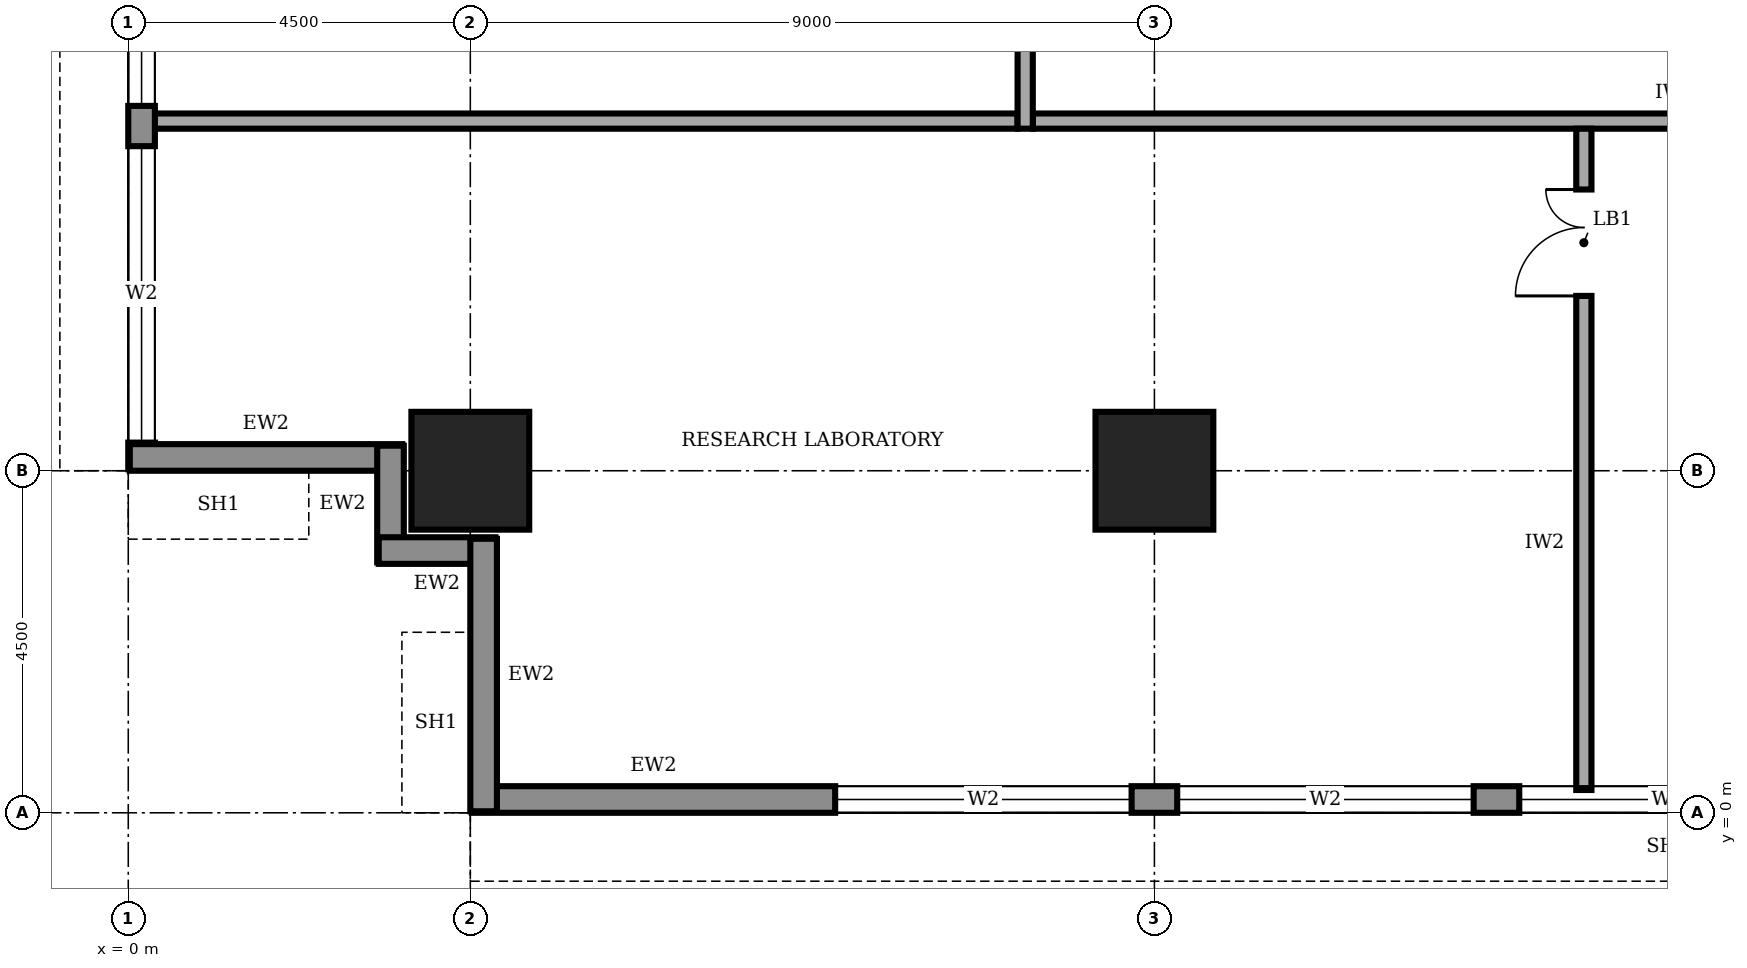
"""IFC4 building model, lengths in metres.
Left out: names, types, materials, properties, quantities, classifications, styles, units other than length and angle.
Written with IfcOpenShell. Run it as: python <this file> out.ifc"""

import sys

from ifc_helpers import new_model, si_unit, direction, frame, frame_2d, origin, origin_2d, place, context, subcontext, project, spatial, rectangle, extrude, element, fill, save


model = new_model("IFC4")
c1 = context("Model", 3, precision=1e-05, world=origin(), true_north=direction((0.0, 1.0)))
c2 = subcontext(c1, "Body", "Model", "MODEL_VIEW")
j1 = project(units=[si_unit("LENGTHUNIT", "METRE"), si_unit("PLANEANGLEUNIT", "RADIAN")], contexts=[c1])
p1 = place(None, origin())
s1 = spatial("IfcSite", under=j1, at=p1, CompositionType="ELEMENT")
p2 = place(p1, origin())
s2 = spatial("IfcBuilding", under=s1, at=p2, CompositionType="ELEMENT")
p3 = place(p2, frame((0.0, 0.0, 233.0)))
s3 = spatial("IfcBuildingStorey", under=s2, at=p3, CompositionType="ELEMENT", Elevation=233.0)
for number, where, z_axis, x_axis in (
    (1, (4.5, 4.5, 0.0), (0.0, 0.0, 1.0), (1.0, 0.0, 0.0)),
    (2, (13.5, 4.5, 0.0), (0.0, 0.0, 1.0), (1.0, 0.0, 0.0)),
):
    element("IfcColumn", number, at=place(p3, frame(where, z_axis=z_axis, x_axis=x_axis)), inside=s3, PredefinedType="COLUMN", context=c2, shape_type="SweptSolid", body=[
        extrude(rectangle(XDim=1.55, YDim=1.55, at=origin_2d()), origin(), (0.0, 0.0, 1.0), 4.0),
    ])
p4 = place(p3, frame((4.52, 0.175, 0.0), z_axis=(0.0, 0.0, 1.0), x_axis=(1.0, 0.0, 0.0)))
e3 = element("IfcWall", 3, at=p4, inside=s3, PredefinedType="STANDARD", context=c2, shape_type="SweptSolid", body=[
    extrude(rectangle(XDim=31.46, YDim=0.35, at=frame_2d((15.73, 0.0))), origin(), (0.0, 0.0, 1.0), 3.75),
])
p5 = place(p4, frame((4.78, 0.0, 0.6)))
e4 = element("IfcOpeningElement", 4, at=p5, cuts=e3, PredefinedType="OPENING", context=c2, shape_type="SweptSolid", body=[
    extrude(rectangle(XDim=3.9, YDim=2.6, at=frame_2d((1.95, 1.3))), frame((0.0, 0.185, 0.0), z_axis=(0.0, -1.0, 0.0), x_axis=(1.0, 0.0, 0.0)), (0.0, 0.0, 1.0), 0.37),
])
p6 = place(p4, frame((9.28, 0.0, 0.6)))
e5 = element("IfcOpeningElement", 5, at=p6, cuts=e3, PredefinedType="OPENING", context=c2, shape_type="SweptSolid", body=[
    extrude(rectangle(XDim=3.9, YDim=2.6, at=frame_2d((1.95, 1.3))), frame((0.0, 0.185, 0.0), z_axis=(0.0, -1.0, 0.0), x_axis=(1.0, 0.0, 0.0)), (0.0, 0.0, 1.0), 0.37),
])
p7 = place(p4, frame((13.78, 0.0, 0.6)))
e6 = element("IfcOpeningElement", 6, at=p7, cuts=e3, PredefinedType="OPENING", context=c2, shape_type="SweptSolid", body=[
    extrude(rectangle(XDim=3.9, YDim=2.6, at=frame_2d((1.95, 1.3))), frame((0.0, 0.185, 0.0), z_axis=(0.0, -1.0, 0.0), x_axis=(1.0, 0.0, 0.0)), (0.0, 0.0, 1.0), 0.37),
])
p8 = place(p4, frame((18.28, 0.0, 0.6)))
e7 = element("IfcOpeningElement", 7, at=p8, cuts=e3, PredefinedType="OPENING", context=c2, shape_type="SweptSolid", body=[
    extrude(rectangle(XDim=3.9, YDim=2.6, at=frame_2d((1.95, 1.3))), frame((0.0, 0.185, 0.0), z_axis=(0.0, -1.0, 0.0), x_axis=(1.0, 0.0, 0.0)), (0.0, 0.0, 1.0), 0.37),
])
p9 = place(p4, frame((22.78, 0.0, 0.6)))
e8 = element("IfcOpeningElement", 8, at=p9, cuts=e3, PredefinedType="OPENING", context=c2, shape_type="SweptSolid", body=[
    extrude(rectangle(XDim=3.9, YDim=2.6, at=frame_2d((1.95, 1.3))), frame((0.0, 0.185, 0.0), z_axis=(0.0, -1.0, 0.0), x_axis=(1.0, 0.0, 0.0)), (0.0, 0.0, 1.0), 0.37),
])
p10 = place(p4, frame((27.21, 0.0, 0.6)))
e9 = element("IfcOpeningElement", 9, at=p10, cuts=e3, PredefinedType="OPENING", context=c2, shape_type="SweptSolid", body=[
    extrude(rectangle(XDim=3.9, YDim=2.6, at=frame_2d((1.95, 1.3))), frame((0.0, 0.185, 0.0), z_axis=(0.0, -1.0, 0.0), x_axis=(1.0, 0.0, 0.0)), (0.0, 0.0, 1.0), 0.37),
])
p11 = place(p3, frame((0.175, 35.98, 0.0), z_axis=(0.0, 0.0, 1.0), x_axis=(0.0, -1.0, 0.0)))
e10 = element("IfcWall", 10, at=p11, inside=s3, PredefinedType="STANDARD", context=c2, shape_type="SweptSolid", body=[
    extrude(rectangle(XDim=31.46, YDim=0.35, at=frame_2d((15.73, 0.0))), origin(), (0.0, 0.0, 1.0), 3.75),
])
p12 = place(p11, frame((27.21, 0.0, 0.6)))
e11 = element("IfcOpeningElement", 11, at=p12, cuts=e10, PredefinedType="OPENING", context=c2, shape_type="SweptSolid", body=[
    extrude(rectangle(XDim=3.9, YDim=2.6, at=frame_2d((1.95, 1.3))), frame((0.0, 0.185, 0.0), z_axis=(0.0, -1.0, 0.0), x_axis=(1.0, 0.0, 0.0)), (0.0, 0.0, 1.0), 0.37),
])
p13 = place(p11, frame((22.78, 0.0, 0.6)))
e12 = element("IfcOpeningElement", 12, at=p13, cuts=e10, PredefinedType="OPENING", context=c2, shape_type="SweptSolid", body=[
    extrude(rectangle(XDim=3.9, YDim=2.6, at=frame_2d((1.95, 1.3))), frame((0.0, 0.185, 0.0), z_axis=(0.0, -1.0, 0.0), x_axis=(1.0, 0.0, 0.0)), (0.0, 0.0, 1.0), 0.37),
])
p14 = place(p11, frame((18.28, 0.0, 0.6)))
e13 = element("IfcOpeningElement", 13, at=p14, cuts=e10, PredefinedType="OPENING", context=c2, shape_type="SweptSolid", body=[
    extrude(rectangle(XDim=3.9, YDim=2.6, at=frame_2d((1.95, 1.3))), frame((0.0, 0.185, 0.0), z_axis=(0.0, -1.0, 0.0), x_axis=(1.0, 0.0, 0.0)), (0.0, 0.0, 1.0), 0.37),
])
p15 = place(p11, frame((13.78, 0.0, 0.6)))
e14 = element("IfcOpeningElement", 14, at=p15, cuts=e10, PredefinedType="OPENING", context=c2, shape_type="SweptSolid", body=[
    extrude(rectangle(XDim=3.9, YDim=2.6, at=frame_2d((1.95, 1.3))), frame((0.0, 0.185, 0.0), z_axis=(0.0, -1.0, 0.0), x_axis=(1.0, 0.0, 0.0)), (0.0, 0.0, 1.0), 0.37),
])
p16 = place(p11, frame((9.28, 0.0, 0.6)))
e15 = element("IfcOpeningElement", 15, at=p16, cuts=e10, PredefinedType="OPENING", context=c2, shape_type="SweptSolid", body=[
    extrude(rectangle(XDim=3.9, YDim=2.6, at=frame_2d((1.95, 1.3))), frame((0.0, 0.185, 0.0), z_axis=(0.0, -1.0, 0.0), x_axis=(1.0, 0.0, 0.0)), (0.0, 0.0, 1.0), 0.37),
])
p17 = place(p11, frame((4.78, 0.0, 0.6)))
e16 = element("IfcOpeningElement", 16, at=p17, cuts=e10, PredefinedType="OPENING", context=c2, shape_type="SweptSolid", body=[
    extrude(rectangle(XDim=3.9, YDim=2.6, at=frame_2d((1.95, 1.3))), frame((0.0, 0.185, 0.0), z_axis=(0.0, -1.0, 0.0), x_axis=(1.0, 0.0, 0.0)), (0.0, 0.0, 1.0), 0.37),
])
p18 = place(p3, frame((0.02, 4.675, 0.0), z_axis=(0.0, 0.0, 1.0), x_axis=(1.0, 0.0, 0.0)))
e17 = element("IfcWall", 17, at=p18, inside=s3, PredefinedType="STANDARD", context=c2, shape_type="SweptSolid", body=[
    extrude(rectangle(XDim=3.585, YDim=0.35, at=frame_2d((1.792, 0.0))), origin(), (0.0, 0.0, 1.0), 2.85),
])
for number, where, z_axis, x_axis in (
    (18, (3.45, 4.83, 0.0), (0.0, 0.0, 1.0), (0.0, -1.0, 0.0)),
    (19, (3.295, 3.45, 0.0), (0.0, 0.0, 1.0), (1.0, 0.0, 0.0)),
):
    element("IfcWall", number, at=place(p3, frame(where, z_axis=z_axis, x_axis=x_axis)), inside=s3, PredefinedType="STANDARD", context=c2, shape_type="SweptSolid", body=[
        extrude(rectangle(XDim=1.535, YDim=0.35, at=frame_2d((0.768, 0.0))), origin(), (0.0, 0.0, 1.0), 3.75),
    ])
p19 = place(p3, frame((4.675, 3.605, 0.0), z_axis=(0.0, 0.0, 1.0), x_axis=(0.0, -1.0, 0.0)))
e20 = element("IfcWall", 20, at=p19, inside=s3, PredefinedType="STANDARD", context=c2, shape_type="SweptSolid", body=[
    extrude(rectangle(XDim=3.585, YDim=0.35, at=frame_2d((1.792, 0.0))), origin(), (0.0, 0.0, 1.0), 2.85),
])
p20 = place(p3, frame((11.9, 9.1, 0.0), z_axis=(0.0, 0.0, 1.0), x_axis=(1.0, 0.0, 0.0)))
e21 = element("IfcWall", 21, at=p20, inside=s3, PredefinedType="SOLIDWALL", context=c2, shape_type="SweptSolid", body=[
    extrude(rectangle(XDim=16.9, YDim=0.2, at=frame_2d((8.45, 0.0))), origin(), (0.0, 0.0, 1.0), 3.75),
])
p21 = place(p3, frame((11.8, 32.05, 0.0), z_axis=(0.0, 0.0, 1.0), x_axis=(0.0, -1.0, 0.0)))
e22 = element("IfcWall", 22, at=p21, inside=s3, PredefinedType="SOLIDWALL", context=c2, shape_type="SweptSolid", body=[
    extrude(rectangle(XDim=23.05, YDim=0.2, at=frame_2d((11.525, 0.0))), origin(), (0.0, 0.0, 1.0), 3.75),
])
p22 = place(p21, frame((20.3, 0.0, 0.0)))
e23 = element("IfcOpeningElement", 23, at=p22, cuts=e22, PredefinedType="OPENING", context=c2, shape_type="SweptSolid", body=[
    extrude(rectangle(XDim=1.0, YDim=2.1, at=frame_2d((0.5, 1.05))), frame((0.0, 0.11, 0.0), z_axis=(0.0, -1.0, 0.0), x_axis=(1.0, 0.0, 0.0)), (0.0, 0.0, 1.0), 0.22),
])
p23 = place(p21, frame((16.2, 0.0, 0.0)))
e24 = element("IfcOpeningElement", 24, at=p23, cuts=e22, PredefinedType="OPENING", context=c2, shape_type="SweptSolid", body=[
    extrude(rectangle(XDim=0.9, YDim=2.1, at=frame_2d((0.45, 1.05))), frame((0.0, 0.11, 0.0), z_axis=(0.0, -1.0, 0.0), x_axis=(1.0, 0.0, 0.0)), (0.0, 0.0, 1.0), 0.22),
])
p24 = place(p21, frame((13.2, 0.0, 0.0)))
e25 = element("IfcOpeningElement", 25, at=p24, cuts=e22, PredefinedType="OPENING", context=c2, shape_type="SweptSolid", body=[
    extrude(rectangle(XDim=0.9, YDim=2.1, at=frame_2d((0.45, 1.05))), frame((0.0, 0.11, 0.0), z_axis=(0.0, -1.0, 0.0), x_axis=(1.0, 0.0, 0.0)), (0.0, 0.0, 1.0), 0.22),
])
p25 = place(p21, frame((8.35, 0.0, 0.0)))
e26 = element("IfcOpeningElement", 26, at=p25, cuts=e22, PredefinedType="OPENING", context=c2, shape_type="SweptSolid", body=[
    extrude(rectangle(XDim=0.9, YDim=2.1, at=frame_2d((0.45, 1.05))), frame((0.0, 0.11, 0.0), z_axis=(0.0, -1.0, 0.0), x_axis=(1.0, 0.0, 0.0)), (0.0, 0.0, 1.0), 0.22),
])
p26 = place(p21, frame((5.55, 0.0, 0.0)))
e27 = element("IfcOpeningElement", 27, at=p26, cuts=e22, PredefinedType="OPENING", context=c2, shape_type="SweptSolid", body=[
    extrude(rectangle(XDim=1.0, YDim=2.1, at=frame_2d((0.5, 1.05))), frame((0.0, 0.11, 0.0), z_axis=(0.0, -1.0, 0.0), x_axis=(1.0, 0.0, 0.0)), (0.0, 0.0, 1.0), 0.22),
])
p27 = place(p21, frame((11.05, 0.0, 0.0)))
e28 = element("IfcOpeningElement", 28, at=p27, cuts=e22, PredefinedType="OPENING", context=c2, shape_type="SweptSolid", body=[
    extrude(rectangle(XDim=1.0, YDim=2.1, at=frame_2d((0.5, 1.05))), frame((0.0, 0.11, 0.0), z_axis=(0.0, -1.0, 0.0), x_axis=(1.0, 0.0, 0.0)), (0.0, 0.0, 1.0), 0.22),
])
p28 = place(p21, frame((1.925, 0.0, 0.0)))
e29 = element("IfcOpeningElement", 29, at=p28, cuts=e22, PredefinedType="OPENING", context=c2, shape_type="SweptSolid", body=[
    extrude(rectangle(XDim=1.0, YDim=2.1, at=frame_2d((0.5, 1.05))), frame((0.0, 0.11, 0.0), z_axis=(0.0, -1.0, 0.0), x_axis=(1.0, 0.0, 0.0)), (0.0, 0.0, 1.0), 0.22),
])
p29 = place(p3, frame((19.15, 0.3, 0.0), z_axis=(0.0, 0.0, 1.0), x_axis=(0.0, 1.0, 0.0)))
e30 = element("IfcWall", 30, at=p29, inside=s3, PredefinedType="SOLIDWALL", context=c2, shape_type="SweptSolid", body=[
    extrude(rectangle(XDim=8.7, YDim=0.2, at=frame_2d((4.35, 0.0))), origin(), (0.0, 0.0, 1.0), 3.75),
])
p30 = place(p29, frame((6.5, 0.0, 0.0)))
e31 = element("IfcOpeningElement", 31, at=p30, cuts=e30, PredefinedType="OPENING", context=c2, shape_type="SweptSolid", body=[
    extrude(rectangle(XDim=1.4, YDim=2.1, at=frame_2d((0.7, 1.05))), frame((0.0, 0.11, 0.0), z_axis=(0.0, -1.0, 0.0), x_axis=(1.0, 0.0, 0.0)), (0.0, 0.0, 1.0), 0.22),
])
p31 = place(p3, frame((0.3, 9.1, 0.0), z_axis=(0.0, 0.0, 1.0), x_axis=(1.0, 0.0, 0.0)))
e32 = element("IfcWall", 32, at=p31, inside=s3, PredefinedType="SOLIDWALL", context=c2, shape_type="SweptSolid", body=[
    extrude(rectangle(XDim=11.4, YDim=0.2, at=frame_2d((5.7, 0.0))), origin(), (0.0, 0.0, 1.0), 3.75),
])
p32 = place(p5, origin())
e33 = element("IfcWindow", 33, at=p32, inside=s3, PartitioningType="SINGLE_PANEL", PredefinedType="WINDOW", context=c2, shape_type="SweptSolid", body=[
    extrude(rectangle(XDim=3.9, YDim=2.6, at=frame_2d((1.95, 1.3))), frame((0.0, 0.03, 0.0), z_axis=(0.0, -1.0, 0.0), x_axis=(1.0, 0.0, 0.0)), (0.0, 0.0, 1.0), 0.06),
])
fill(e4, e33)
p33 = place(p6, origin())
e34 = element("IfcWindow", 34, at=p33, inside=s3, PartitioningType="SINGLE_PANEL", PredefinedType="WINDOW", context=c2, shape_type="SweptSolid", body=[
    extrude(rectangle(XDim=3.9, YDim=2.6, at=frame_2d((1.95, 1.3))), frame((0.0, 0.03, 0.0), z_axis=(0.0, -1.0, 0.0), x_axis=(1.0, 0.0, 0.0)), (0.0, 0.0, 1.0), 0.06),
])
fill(e5, e34)
p34 = place(p7, origin())
e35 = element("IfcWindow", 35, at=p34, inside=s3, PartitioningType="SINGLE_PANEL", PredefinedType="WINDOW", context=c2, shape_type="SweptSolid", body=[
    extrude(rectangle(XDim=3.9, YDim=2.6, at=frame_2d((1.95, 1.3))), frame((0.0, 0.03, 0.0), z_axis=(0.0, -1.0, 0.0), x_axis=(1.0, 0.0, 0.0)), (0.0, 0.0, 1.0), 0.06),
])
fill(e6, e35)
p35 = place(p12, origin())
e36 = element("IfcWindow", 36, at=p35, inside=s3, PartitioningType="SINGLE_PANEL", PredefinedType="WINDOW", context=c2, shape_type="SweptSolid", body=[
    extrude(rectangle(XDim=3.9, YDim=2.6, at=frame_2d((1.95, 1.3))), frame((0.0, 0.03, 0.0), z_axis=(0.0, -1.0, 0.0), x_axis=(1.0, 0.0, 0.0)), (0.0, 0.0, 1.0), 0.06),
])
fill(e11, e36)
p36 = place(p13, origin())
e37 = element("IfcWindow", 37, at=p36, inside=s3, PartitioningType="SINGLE_PANEL", PredefinedType="WINDOW", context=c2, shape_type="SweptSolid", body=[
    extrude(rectangle(XDim=3.9, YDim=2.6, at=frame_2d((1.95, 1.3))), frame((0.0, 0.03, 0.0), z_axis=(0.0, -1.0, 0.0), x_axis=(1.0, 0.0, 0.0)), (0.0, 0.0, 1.0), 0.06),
])
fill(e12, e37)
p37 = place(p30, origin())
e38 = element("IfcDoor", 38, at=p37, inside=s3, OperationType="DOUBLE_DOOR_SINGLE_SWING", PredefinedType="DOOR", context=c2, shape_type="SweptSolid", body=[
    extrude(rectangle(XDim=1.4, YDim=2.1, at=frame_2d((0.7, 1.05))), frame((0.0, 0.025, 0.0), z_axis=(0.0, -1.0, 0.0), x_axis=(1.0, 0.0, 0.0)), (0.0, 0.0, 1.0), 0.05),
])
fill(e31, e38)
save(model, sys.argv[1])
